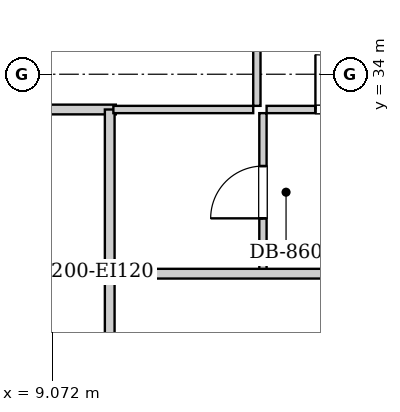
"""IFC4 building model, lengths in metres.
Left out: names, types, materials, properties, quantities, classifications, styles, units other than length and angle.
Written with IfcOpenShell. Run it as: python <this file> out.ifc"""

import sys

from ifc_helpers import new_model, si_unit, direction, frame, frame_2d, origin, place, context, subcontext, project, spatial, rectangle, extrude, element, fill, save


model = new_model("IFC4")
c1 = context("Model", 3, precision=1e-05, world=origin(), true_north=direction((0.0, 1.0)))
c2 = subcontext(c1, "Body", "Model", "MODEL_VIEW")
j1 = project(units=[si_unit("LENGTHUNIT", "METRE"), si_unit("PLANEANGLEUNIT", "RADIAN")], contexts=[c1])
p1 = place(None, origin())
s1 = spatial("IfcSite", under=j1, at=p1, CompositionType="ELEMENT")
p2 = place(p1, origin())
s2 = spatial("IfcBuilding", under=s1, at=p2, CompositionType="ELEMENT")
p3 = place(p2, frame((0.0, 0.0, 25.8)))
s3 = spatial("IfcBuildingStorey", under=s2, at=p3, CompositionType="ELEMENT", Elevation=25.8)
p4 = place(p3, frame((10.02, 28.98, 0.0), z_axis=(0.0, 0.0, 1.0), x_axis=(0.0, 1.0, 0.0)))
e1 = element("IfcWall", 1, at=p4, inside=s3, PredefinedType="PARTITIONING", context=c2, shape_type="SweptSolid", body=[
    extrude(rectangle(XDim=1.74, YDim=0.16, at=frame_2d((0.87, 0.0))), origin(), (0.0, 0.0, 1.0), 2.94),
])
p5 = place(p3, frame((7.78, 33.42, 0.0), z_axis=(0.0, 0.0, 1.0), x_axis=(1.0, 0.0, 0.0)))
e2 = element("IfcWall", 2, at=p5, inside=s3, PredefinedType="PARTITIONING", context=c2, shape_type="SweptSolid", body=[
    extrude(rectangle(XDim=2.34, YDim=0.16, at=frame_2d((1.17, 0.0))), origin(), (0.0, 0.0, 1.0), 2.94),
])
p6 = place(p3, frame((10.02, 30.76, 0.0), z_axis=(0.0, 0.0, 1.0), x_axis=(0.0, 1.0, 0.0)))
e3 = element("IfcWall", 3, at=p6, inside=s3, PredefinedType="PARTITIONING", context=c2, shape_type="SweptSolid", body=[
    extrude(rectangle(XDim=2.66, YDim=0.16, at=frame_2d((1.33, 0.0))), origin(), (0.0, 0.0, 1.0), 2.94),
])
p7 = place(p3, frame((12.54, 30.76, 0.0), z_axis=(0.0, 0.0, 1.0), x_axis=(0.0, 1.0, 0.0)))
e4 = element("IfcWall", 4, at=p7, inside=s3, PredefinedType="PARTITIONING", context=c2, shape_type="SweptSolid", body=[
    extrude(rectangle(XDim=2.6, YDim=0.12, at=frame_2d((1.3, 0.0))), origin(), (0.0, 0.0, 1.0), 2.94),
])
p8 = place(p7, frame((0.87, 0.0, 0.0)))
e5 = element("IfcOpeningElement", 5, at=p8, cuts=e4, PredefinedType="OPENING", context=c2, shape_type="SweptSolid", body=[
    extrude(rectangle(XDim=0.86, YDim=2.05, at=frame_2d((0.43, 1.025))), frame((0.0, 0.07, 0.0), z_axis=(0.0, -1.0, 0.0), x_axis=(1.0, 0.0, 0.0)), (0.0, 0.0, 1.0), 0.14),
])
p9 = place(p3, frame((10.08, 33.42, 0.0), z_axis=(0.0, 0.0, 1.0), x_axis=(1.0, 0.0, 0.0)))
e6 = element("IfcWall", 6, at=p9, inside=s3, PredefinedType="PARTITIONING", context=c2, shape_type="SweptSolid", body=[
    extrude(rectangle(XDim=2.3, YDim=0.12, at=frame_2d((1.15, 0.0))), origin(), (0.0, 0.0, 1.0), 2.94),
])
p10 = place(p3, frame((12.6, 33.42, 0.0), z_axis=(0.0, 0.0, 1.0), x_axis=(1.0, 0.0, 0.0)))
e7 = element("IfcWall", 7, at=p10, inside=s3, PredefinedType="PARTITIONING", context=c2, shape_type="SweptSolid", body=[
    extrude(rectangle(XDim=2.507, YDim=0.12, at=frame_2d((1.253, 0.0))), origin(), (0.0, 0.0, 1.0), 2.94),
])
p11 = place(p10, frame((0.803, 0.0, 0.0)))
e8 = element("IfcOpeningElement", 8, at=p11, cuts=e7, PredefinedType="OPENING", context=c2, shape_type="SweptSolid", body=[
    extrude(rectangle(XDim=0.9, YDim=2.05, at=frame_2d((0.45, 1.025))), frame((0.0, 0.07, 0.0), z_axis=(0.0, -1.0, 0.0), x_axis=(1.0, 0.0, 0.0)), (0.0, 0.0, 1.0), 0.14),
])
p12 = place(p3, frame((12.44, 33.48, 0.0), z_axis=(0.0, 0.0, 1.0), x_axis=(0.0, 1.0, 0.0)))
e9 = element("IfcWall", 9, at=p12, inside=s3, PredefinedType="PARTITIONING", context=c2, shape_type="SweptSolid", body=[
    extrude(rectangle(XDim=13.84, YDim=0.12, at=frame_2d((6.92, 0.0))), origin(), (0.0, 0.0, 1.0), 2.94),
])
p13 = place(p12, frame((6.455, 0.0, 0.0)))
e10 = element("IfcOpeningElement", 10, at=p13, cuts=e9, PredefinedType="OPENING", context=c2, shape_type="SweptSolid", body=[
    extrude(rectangle(XDim=0.9, YDim=2.05, at=frame_2d((0.45, 1.025))), frame((0.0, 0.07, 0.0), z_axis=(0.0, -1.0, 0.0), x_axis=(1.0, 0.0, 0.0)), (0.0, 0.0, 1.0), 0.14),
])
p14 = place(p3, frame((10.05, 30.72, 0.0), z_axis=(0.0, 0.0, 1.0), x_axis=(1.0, 0.0, 0.0)))
e11 = element("IfcWall", 11, at=p14, inside=s3, PredefinedType="PARTITIONING", context=c2, shape_type="SweptSolid", body=[
    extrude(rectangle(XDim=33.9, YDim=0.16, at=frame_2d((16.95, 0.0))), origin(), (0.0, 0.0, 1.0), 2.94),
])
p15 = place(p14, frame((4.295, 0.0, 0.0)))
e12 = element("IfcOpeningElement", 12, at=p15, cuts=e11, PredefinedType="OPENING", context=c2, shape_type="SweptSolid", body=[
    extrude(rectangle(XDim=0.95, YDim=2.1, at=frame_2d((0.475, 1.05))), frame((0.0, 0.09, 0.0), z_axis=(0.0, -1.0, 0.0), x_axis=(1.0, 0.0, 0.0)), (0.0, 0.0, 1.0), 0.18),
])
p16 = place(p14, frame((27.235, 0.0, 0.0)))
e13 = element("IfcOpeningElement", 13, at=p16, cuts=e11, PredefinedType="OPENING", context=c2, shape_type="SweptSolid", body=[
    extrude(rectangle(XDim=0.95, YDim=2.1, at=frame_2d((0.475, 1.05))), frame((0.0, 0.09, 0.0), z_axis=(0.0, -1.0, 0.0), x_axis=(1.0, 0.0, 0.0)), (0.0, 0.0, 1.0), 0.18),
])
p17 = place(p8, origin())
e14 = element("IfcDoor", 14, at=p17, inside=s3, OperationType="SINGLE_SWING_LEFT", PredefinedType="DOOR", context=c2, shape_type="SweptSolid", body=[
    extrude(rectangle(XDim=0.86, YDim=2.05, at=frame_2d((0.43, 1.025))), frame((0.0, 0.025, 0.0), z_axis=(0.0, -1.0, 0.0), x_axis=(1.0, 0.0, 0.0)), (0.0, 0.0, 1.0), 0.05),
])
fill(e5, e14)
p18 = place(p11, origin())
e15 = element("IfcDoor", 15, at=p18, inside=s3, OperationType="SINGLE_SWING_LEFT", PredefinedType="DOOR", context=c2, shape_type="SweptSolid", body=[
    extrude(rectangle(XDim=0.9, YDim=2.05, at=frame_2d((0.45, 1.025))), frame((0.0, 0.025, 0.0), z_axis=(0.0, -1.0, 0.0), x_axis=(1.0, 0.0, 0.0)), (0.0, 0.0, 1.0), 0.05),
])
fill(e8, e15)
save(model, sys.argv[1])
